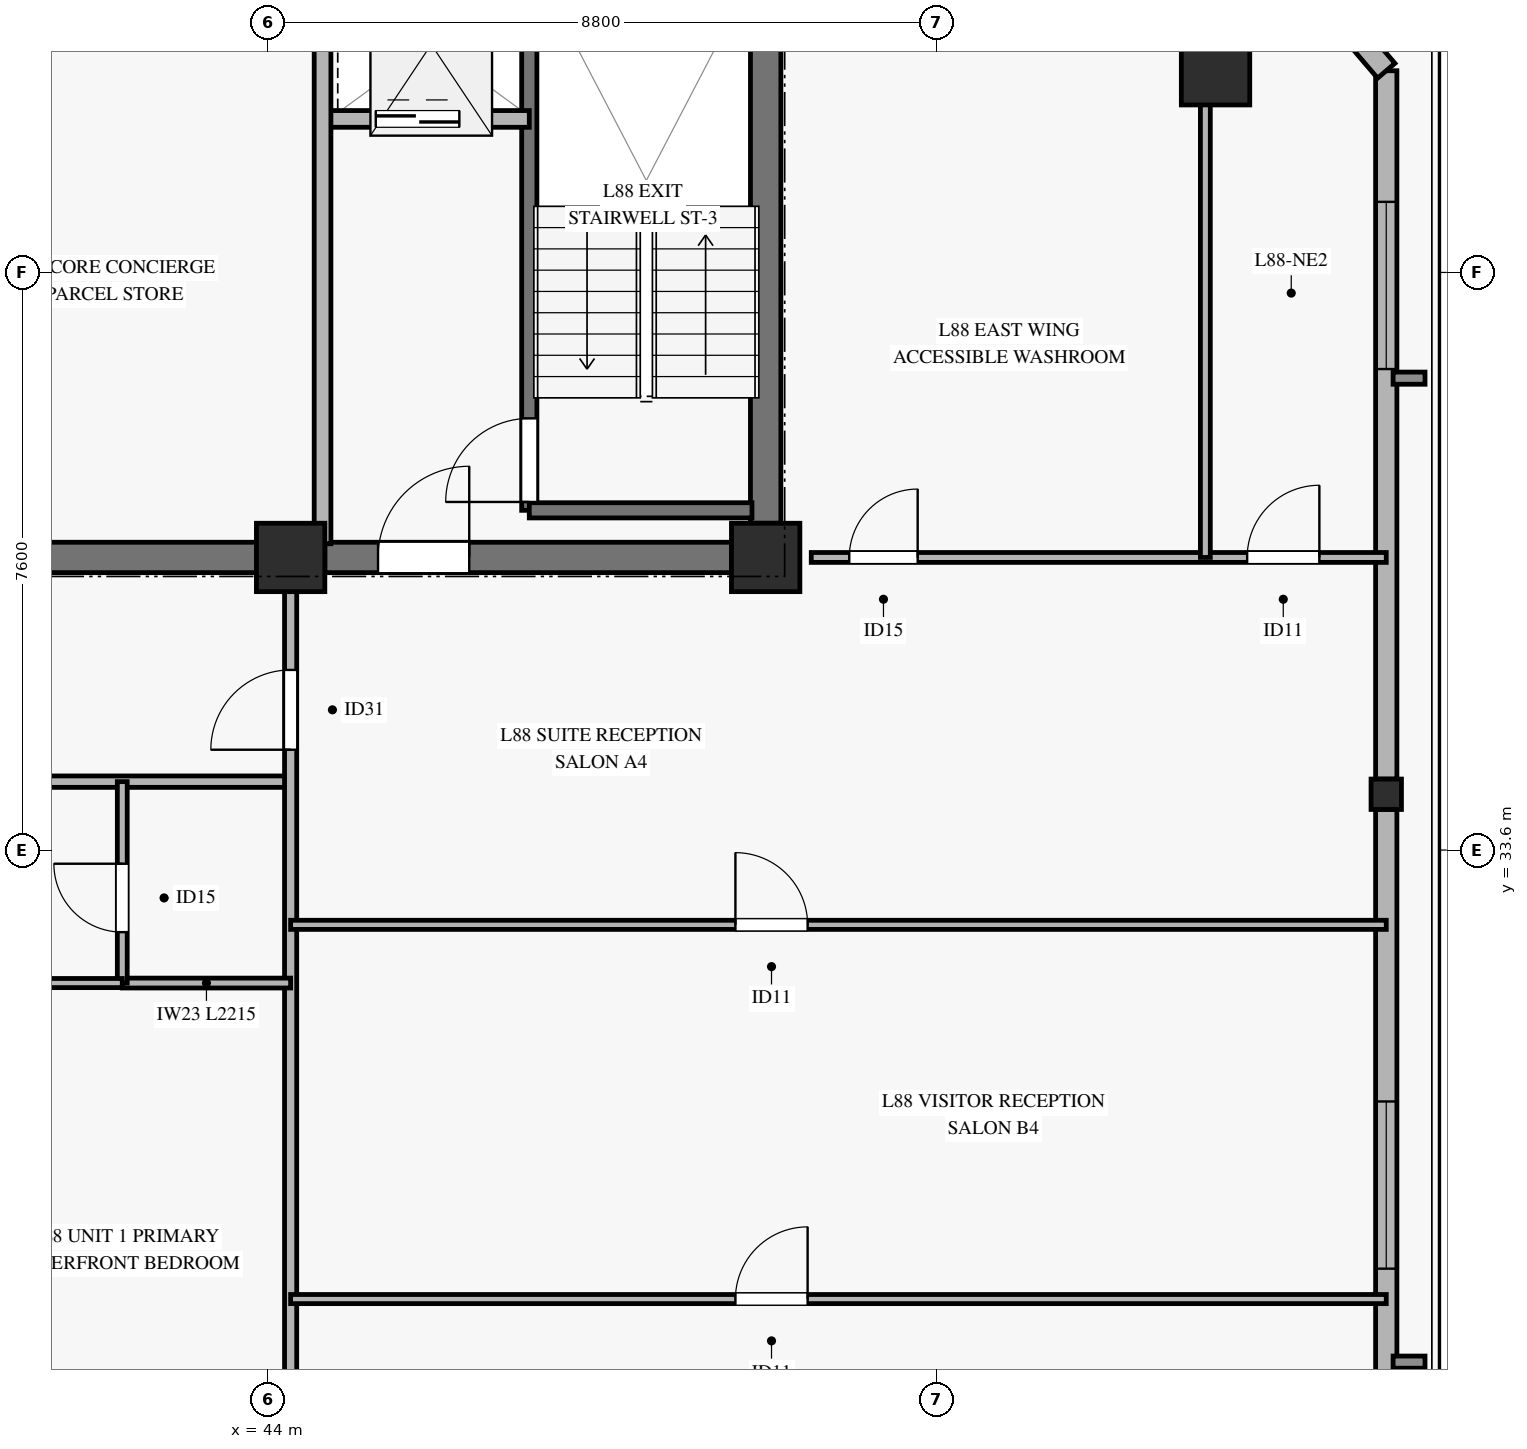
"""IFC4 building model, lengths in metres.
Left out: names, types, materials, properties, quantities, classifications, styles, units other than length and angle.
Written with IfcOpenShell. Run it as: python <this file> out.ifc"""

import sys

from ifc_helpers import new_model, si_unit, direction, frame, frame_2d, origin, origin_2d, place, context, subcontext, project, spatial, rectangle, hollow_rectangle, extrude, source, transform, mapped, element, fill, save


model = new_model("IFC4")
c1 = context("Model", 3, precision=1e-05, world=origin(), true_north=direction((0.0, 1.0)))
c2 = subcontext(c1, "Body", "Model", "MODEL_VIEW")
j1 = project(units=[si_unit("LENGTHUNIT", "METRE"), si_unit("PLANEANGLEUNIT", "RADIAN")], contexts=[c1])
p1 = place(None, origin())
s1 = spatial("IfcSite", under=j1, at=p1, CompositionType="ELEMENT")
p2 = place(p1, origin())
s2 = spatial("IfcBuilding", under=s1, at=p2, CompositionType="ELEMENT")
p3 = place(p2, frame((0.0, 0.0, 339.1)))
s3 = spatial("IfcBuildingStorey", under=s2, at=p3, CompositionType="ELEMENT", Elevation=339.1)
m1 = source(origin(), c2, "Body", "SweptSolid", [
    extrude(rectangle(XDim=0.9, YDim=0.9, at=origin_2d()), origin(), (0.0, 0.0, 1.0), 3.185),
])
for number, where, z_axis, x_axis in (
    (1, (44.3, 37.45, 0.0), (0.0, 0.0, 1.0), (1.0, 0.0, 0.0)),
    (2, (50.55, 37.45, 0.0), (0.0, 0.0, 1.0), (1.0, 0.0, 0.0)),
):
    element("IfcColumn", number, at=place(p3, frame(where, z_axis=z_axis, x_axis=x_axis)), inside=s3, PredefinedType="PILASTER", context=c2, shape_type="MappedRepresentation", body=[
        mapped(m1, transform((0.0, 0.0, 0.0), x_axis=(1.0, 0.0, 0.0), y_axis=(0.0, 1.0, 0.0), z_axis=(0.0, 0.0, 1.0), scale=1.0)),
    ])
p4 = place(p3, frame((36.05, 37.45, 0.0), z_axis=(0.0, 0.0, 1.0), x_axis=(1.0, 0.0, 0.0)))
e3 = element("IfcWall", 3, at=p4, inside=s3, PredefinedType="SHEAR", context=c2, shape_type="SweptSolid", body=[
    extrude(rectangle(XDim=7.8, YDim=0.4, at=frame_2d((3.9, 0.0))), origin(), (0.0, 0.0, 1.0), 3.185),
])
p5 = place(p3, frame((44.75, 37.45, 0.0), z_axis=(0.0, 0.0, 1.0), x_axis=(1.0, 0.0, 0.0)))
e4 = element("IfcWall", 4, at=p5, inside=s3, PredefinedType="SHEAR", context=c2, shape_type="SweptSolid", body=[
    extrude(rectangle(XDim=5.35, YDim=0.4, at=frame_2d((2.675, 0.0))), origin(), (0.0, 0.0, 1.0), 3.185),
])
p6 = place(p5, frame((0.7, 0.0, 0.0)))
e5 = element("IfcOpeningElement", 5, at=p6, cuts=e4, PredefinedType="OPENING", context=c2, shape_type="SweptSolid", body=[
    extrude(rectangle(XDim=1.2, YDim=2.15, at=frame_2d((0.6, 1.075))), frame((0.0, 0.21, 0.0), z_axis=(0.0, -1.0, 0.0), x_axis=(1.0, 0.0, 0.0)), (0.0, 0.0, 1.0), 0.42),
])
p7 = place(p3, frame((50.55, 37.9, 0.0), z_axis=(0.0, 0.0, 1.0), x_axis=(0.0, 1.0, 0.0)))
e6 = element("IfcWall", 6, at=p7, inside=s3, PredefinedType="SHEAR", context=c2, shape_type="SweptSolid", body=[
    extrude(rectangle(XDim=8.2, YDim=0.4, at=frame_2d((4.1, 0.0))), origin(), (0.0, 0.0, 1.0), 3.185),
])
m2 = source(origin(), c2, "Body", "SweptSolid", [
    extrude(hollow_rectangle(XDim=0.9, YDim=0.9, WallThickness=0.04, at=origin_2d()), origin(), (0.0, 0.0, 1.0), 3.185),
])
p8 = place(p3, frame((56.469, 43.854, 0.0), z_axis=(0.0, 0.0, 1.0), x_axis=(1.0, 0.0, 0.0)))
e7 = element("IfcColumn", 7, at=p8, inside=s3, PredefinedType="COLUMN", context=c2, shape_type="MappedRepresentation", body=[
    mapped(m2, transform((0.0, 0.0, 0.0), x_axis=(1.0, 0.0, 0.0), y_axis=(0.0, 1.0, 0.0), z_axis=(0.0, 0.0, 1.0), scale=1.0)),
])
m3 = source(origin(), c2, "Body", "SweptSolid", [
    extrude(hollow_rectangle(XDim=0.4, YDim=0.4, WallThickness=0.02, at=origin_2d()), origin(), (0.0, 0.0, 1.0), 3.185),
])
p9 = place(p3, frame((58.715, 34.334, 0.0), z_axis=(0.0, 0.0, 1.0), x_axis=(1.0, 0.0, 0.0)))
e8 = element("IfcColumn", 8, at=p9, inside=s3, PredefinedType="COLUMN", context=c2, shape_type="MappedRepresentation", body=[
    mapped(m3, transform((0.0, 0.0, 0.0), x_axis=(1.0, 0.0, 0.0), y_axis=(0.0, 1.0, 0.0), z_axis=(0.0, 0.0, 1.0), scale=1.0)),
])
p10 = place(p3, frame((58.715, 24.814, 0.0), z_axis=(0.0, 0.0, 1.0), x_axis=(0.0, 1.0, 0.0)))
e9 = element("IfcWall", 9, at=p10, inside=s3, PredefinedType="SOLIDWALL", context=c2, shape_type="SweptSolid", body=[
    extrude(rectangle(XDim=9.32, YDim=0.28, at=frame_2d((4.66, 0.0))), origin(), (0.0, 0.0, 1.0), 2.815),
])
p11 = place(p10, frame((3.278, 0.0, 0.45)))
e10 = element("IfcOpeningElement", 10, at=p11, cuts=e9, PredefinedType="OPENING", context=c2, shape_type="SweptSolid", body=[
    extrude(rectangle(XDim=2.2, YDim=2.1, at=frame_2d((1.1, 1.05))), frame((0.0, 0.15, 0.0), z_axis=(0.0, -1.0, 0.0), x_axis=(1.0, 0.0, 0.0)), (0.0, 0.0, 1.0), 0.3),
])
p12 = place(p3, frame((58.715, 34.534, 0.0), z_axis=(0.0, 0.0, 1.0), x_axis=(0.0, 1.0, 0.0)))
e11 = element("IfcWall", 11, at=p12, inside=s3, PredefinedType="SOLIDWALL", context=c2, shape_type="SweptSolid", body=[
    extrude(rectangle(XDim=9.32, YDim=0.28, at=frame_2d((4.66, 0.0))), origin(), (0.0, 0.0, 1.0), 2.815),
])
p13 = place(p12, frame((5.395, 0.0, 0.45)))
e12 = element("IfcOpeningElement", 12, at=p13, cuts=e11, PredefinedType="OPENING", context=c2, shape_type="SweptSolid", body=[
    extrude(rectangle(XDim=2.2, YDim=2.1, at=frame_2d((1.1, 1.05))), frame((0.0, 0.15, 0.0), z_axis=(0.0, -1.0, 0.0), x_axis=(1.0, 0.0, 0.0)), (0.0, 0.0, 1.0), 0.3),
])
p14 = place(p3, frame((58.715, 43.854, 0.0), z_axis=(0.0, 0.0, 1.0), x_axis=(-0.64940558052, 0.760442234486, 0.0)))
e13 = element("IfcWall", 13, at=p14, inside=s3, PredefinedType="SOLIDWALL", context=c2, shape_type="SweptSolid", body=[
    extrude(rectangle(XDim=3.151, YDim=0.3, at=frame_2d((1.575, 0.0))), origin(), (0.0, 0.0, 1.0), 2.815),
])
p15 = place(p14, frame((0.775, 0.0, 0.45)))
e14 = element("IfcOpeningElement", 14, at=p15, cuts=e13, PredefinedType="OPENING", context=c2, shape_type="SweptSolid", body=[
    extrude(rectangle(XDim=1.6, YDim=2.0, at=frame_2d((0.8, 1.0))), frame((0.0, 0.16, 0.0), z_axis=(0.0, -1.0, 0.0), x_axis=(1.0, 0.0, 0.0)), (0.0, 0.0, 1.0), 0.32),
])
p16 = place(p3, frame((47.44, 38.07, 0.0), z_axis=(0.0, 0.0, 1.0), x_axis=(0.0, 1.0, 0.0)))
e15 = element("IfcWall", 15, at=p16, inside=s3, PredefinedType="SOLIDWALL", context=c2, shape_type="SweptSolid", body=[
    extrude(rectangle(XDim=7.25, YDim=0.2, at=frame_2d((3.625, 0.0))), origin(), (0.0, 0.0, 1.0), 3.4),
])
p17 = place(p16, frame((0.11, 0.0, 0.0)))
e16 = element("IfcOpeningElement", 16, at=p17, cuts=e15, PredefinedType="OPENING", context=c2, shape_type="SweptSolid", body=[
    extrude(rectangle(XDim=1.1, YDim=2.15, at=frame_2d((0.55, 1.075))), frame((0.0, 0.11, 0.0), z_axis=(0.0, -1.0, 0.0), x_axis=(1.0, 0.0, 0.0)), (0.0, 0.0, 1.0), 0.22),
])
p18 = place(p3, frame((47.44, 38.07, 0.0), z_axis=(0.0, 0.0, 1.0), x_axis=(1.0, 0.0, 0.0)))
e17 = element("IfcWall", 17, at=p18, inside=s3, PredefinedType="SOLIDWALL", context=c2, shape_type="SweptSolid", body=[
    extrude(rectangle(XDim=2.93, YDim=0.2, at=frame_2d((1.465, 0.0))), origin(), (0.0, 0.0, 1.0), 3.4),
])
p19 = place(p3, frame((44.72, 43.22, 0.0), z_axis=(0.0, 0.0, 1.0), x_axis=(1.0, 0.0, 0.0)))
e18 = element("IfcWall", 18, at=p19, inside=s3, PredefinedType="SOLIDWALL", context=c2, shape_type="SweptSolid", body=[
    extrude(rectangle(XDim=2.72, YDim=0.22, at=frame_2d((1.36, 0.0))), origin(), (0.0, 0.0, 1.0), 3.185),
])
p20 = place(p19, frame((0.7, 0.0, 0.0)))
e19 = element("IfcOpeningElement", 19, at=p20, cuts=e18, PredefinedType="OPENING", context=c2, shape_type="SweptSolid", body=[
    extrude(rectangle(XDim=1.1, YDim=2.2, at=frame_2d((0.55, 1.1))), frame((0.0, 0.12, 0.0), z_axis=(0.0, -1.0, 0.0), x_axis=(1.0, 0.0, 0.0)), (0.0, 0.0, 1.0), 0.24),
])
p21 = place(p3, frame((44.72, 37.63, 0.0), z_axis=(0.0, 0.0, 1.0), x_axis=(0.0, 1.0, 0.0)))
e20 = element("IfcWall", 20, at=p21, inside=s3, PredefinedType="SOLIDWALL", context=c2, shape_type="SweptSolid", body=[
    extrude(rectangle(XDim=7.59, YDim=0.22, at=frame_2d((3.795, 0.0))), origin(), (0.0, 0.0, 1.0), 3.185),
])
p22 = place(p3, frame((23.5, 34.5, 0.0), z_axis=(0.0, 0.0, 1.0), x_axis=(1.0, 0.0, 0.0)))
e21 = element("IfcWall", 21, at=p22, inside=s3, PredefinedType="PARTITIONING", context=c2, shape_type="SweptSolid", body=[
    extrude(rectangle(XDim=20.8, YDim=0.15, at=frame_2d((10.4, 0.0))), origin(), (0.0, 0.0, 1.0), 2.47),
])
p23 = place(p22, frame((4.767, 0.0, 0.0)))
e22 = element("IfcOpeningElement", 22, at=p23, cuts=e21, PredefinedType="OPENING", context=c2, shape_type="SweptSolid", body=[
    extrude(rectangle(XDim=1.05, YDim=2.15, at=frame_2d((0.525, 1.075))), frame((0.0, 0.085, 0.0), z_axis=(0.0, -1.0, 0.0), x_axis=(1.0, 0.0, 0.0)), (0.0, 0.0, 1.0), 0.17),
])
p24 = place(p22, frame((16.025, 0.0, 0.0)))
e23 = element("IfcOpeningElement", 23, at=p24, cuts=e21, PredefinedType="OPENING", context=c2, shape_type="SweptSolid", body=[
    extrude(rectangle(XDim=1.05, YDim=2.15, at=frame_2d((0.525, 1.075))), frame((0.0, 0.085, 0.0), z_axis=(0.0, -1.0, 0.0), x_axis=(1.0, 0.0, 0.0)), (0.0, 0.0, 1.0), 0.17),
])
p25 = place(p3, frame((44.3, 22.568, 0.0), z_axis=(0.0, 0.0, 1.0), x_axis=(0.0, 1.0, 0.0)))
e24 = element("IfcWall", 24, at=p25, inside=s3, PredefinedType="PARTITIONING", context=c2, shape_type="SweptSolid", body=[
    extrude(rectangle(XDim=14.882, YDim=0.16, at=frame_2d((7.441, 0.0))), origin(), (0.0, 0.0, 1.0), 2.47),
])
p26 = place(p25, frame((12.352, 0.0, 0.0)))
e25 = element("IfcOpeningElement", 25, at=p26, cuts=e24, PredefinedType="OPENING", context=c2, shape_type="SweptSolid", body=[
    extrude(rectangle(XDim=1.05, YDim=2.15, at=frame_2d((0.525, 1.075))), frame((0.0, 0.09, 0.0), z_axis=(0.0, -1.0, 0.0), x_axis=(1.0, 0.0, 0.0)), (0.0, 0.0, 1.0), 0.18),
])
p27 = place(p3, frame((42.085, 31.85, 0.0), z_axis=(0.0, 0.0, 1.0), x_axis=(1.0, 0.0, 0.0)))
e26 = element("IfcWall", 26, at=p27, inside=s3, PredefinedType="PARTITIONING", context=c2, shape_type="SweptSolid", body=[
    extrude(rectangle(XDim=2.215, YDim=0.13, at=frame_2d((1.107, 0.0))), origin(), (0.0, 0.0, 1.0), 2.47),
])
p28 = place(p3, frame((42.085, 31.85, 0.0), z_axis=(0.0, 0.0, 1.0), x_axis=(0.0, 1.0, 0.0)))
e27 = element("IfcWall", 27, at=p28, inside=s3, PredefinedType="PARTITIONING", context=c2, shape_type="SweptSolid", body=[
    extrude(rectangle(XDim=2.65, YDim=0.13, at=frame_2d((1.325, 0.0))), origin(), (0.0, 0.0, 1.0), 2.77),
])
p29 = place(p28, frame((0.67, 0.0, 0.0)))
e28 = element("IfcOpeningElement", 28, at=p29, cuts=e27, PredefinedType="OPENING", context=c2, shape_type="SweptSolid", body=[
    extrude(rectangle(XDim=0.9, YDim=2.1, at=frame_2d((0.45, 1.05))), frame((0.0, 0.075, 0.0), z_axis=(0.0, -1.0, 0.0), x_axis=(1.0, 0.0, 0.0)), (0.0, 0.0, 1.0), 0.15),
])
p30 = place(p3, frame((39.95, 31.85, 0.0), z_axis=(0.0, 0.0, 1.0), x_axis=(1.0, 0.0, 0.0)))
e29 = element("IfcWall", 29, at=p30, inside=s3, PredefinedType="PARTITIONING", context=c2, shape_type="SweptSolid", body=[
    extrude(rectangle(XDim=2.135, YDim=0.12, at=frame_2d((1.067, 0.0))), origin(), (0.0, 0.0, 1.0), 3.185),
])
p31 = place(p3, frame((44.3, 27.692, 0.0), z_axis=(0.0, 0.0, 1.0), x_axis=(1.0, 0.0, 0.0)))
e30 = element("IfcWall", 30, at=p31, inside=s3, PredefinedType="PARTITIONING", context=c2, shape_type="SweptSolid", body=[
    extrude(rectangle(XDim=14.415, YDim=0.12, at=frame_2d((7.208, 0.0))), origin(), (0.0, 0.0, 1.0), 2.47),
])
p32 = place(p31, frame((5.852, 0.0, 0.0)))
e31 = element("IfcOpeningElement", 31, at=p32, cuts=e30, PredefinedType="OPENING", context=c2, shape_type="SweptSolid", body=[
    extrude(rectangle(XDim=0.95, YDim=2.1, at=frame_2d((0.475, 1.05))), frame((0.0, 0.07, 0.0), z_axis=(0.0, -1.0, 0.0), x_axis=(1.0, 0.0, 0.0)), (0.0, 0.0, 1.0), 0.14),
])
p33 = place(p3, frame((44.3, 32.616, 0.0), z_axis=(0.0, 0.0, 1.0), x_axis=(1.0, 0.0, 0.0)))
e32 = element("IfcWall", 32, at=p33, inside=s3, PredefinedType="PARTITIONING", context=c2, shape_type="SweptSolid", body=[
    extrude(rectangle(XDim=14.415, YDim=0.12, at=frame_2d((7.208, 0.0))), origin(), (0.0, 0.0, 1.0), 2.47),
])
p34 = place(p33, frame((5.852, 0.0, 0.0)))
e33 = element("IfcOpeningElement", 33, at=p34, cuts=e32, PredefinedType="OPENING", context=c2, shape_type="SweptSolid", body=[
    extrude(rectangle(XDim=0.95, YDim=2.1, at=frame_2d((0.475, 1.05))), frame((0.0, 0.07, 0.0), z_axis=(0.0, -1.0, 0.0), x_axis=(1.0, 0.0, 0.0)), (0.0, 0.0, 1.0), 0.14),
])
p35 = place(p3, frame((51.15, 37.45, 0.0), z_axis=(0.0, 0.0, 1.0), x_axis=(1.0, 0.0, 0.0)))
e34 = element("IfcWall", 34, at=p35, inside=s3, PredefinedType="PARTITIONING", context=c2, shape_type="SweptSolid", body=[
    extrude(rectangle(XDim=7.565, YDim=0.13, at=frame_2d((3.783, 0.0))), origin(), (0.0, 0.0, 1.0), 2.82),
])
p36 = place(p35, frame((0.5, 0.0, 0.0)))
e35 = element("IfcOpeningElement", 35, at=p36, cuts=e34, PredefinedType="OPENING", context=c2, shape_type="SweptSolid", body=[
    extrude(rectangle(XDim=0.9, YDim=2.1, at=frame_2d((0.45, 1.05))), frame((0.0, 0.075, 0.0), z_axis=(0.0, -1.0, 0.0), x_axis=(1.0, 0.0, 0.0)), (0.0, 0.0, 1.0), 0.15),
])
p37 = place(p35, frame((5.735, 0.0, 0.0)))
e36 = element("IfcOpeningElement", 36, at=p37, cuts=e34, PredefinedType="OPENING", context=c2, shape_type="SweptSolid", body=[
    extrude(rectangle(XDim=0.95, YDim=2.1, at=frame_2d((0.475, 1.05))), frame((0.0, 0.075, 0.0), z_axis=(0.0, -1.0, 0.0), x_axis=(1.0, 0.0, 0.0)), (0.0, 0.0, 1.0), 0.15),
])
p38 = place(p3, frame((56.335, 37.45, 0.0), z_axis=(0.0, 0.0, 1.0), x_axis=(0.0, 1.0, 0.0)))
e37 = element("IfcWall", 37, at=p38, inside=s3, PredefinedType="PARTITIONING", context=c2, shape_type="SweptSolid", body=[
    extrude(rectangle(XDim=8.8, YDim=0.13, at=frame_2d((4.4, 0.0))), origin(), (0.0, 0.0, 1.0), 2.82),
])
m4 = source(origin(), c2, "Body", "SweptSolid", [
    extrude(rectangle(XDim=2.2, YDim=2.1, at=frame_2d((1.1, 1.05))), frame((0.0, 0.03, 0.0), z_axis=(0.0, -1.0, 0.0), x_axis=(1.0, 0.0, 0.0)), (0.0, 0.0, 1.0), 0.06),
])
p39 = place(p11, origin())
e38 = element("IfcWindow", 38, at=p39, inside=s3, PartitioningType="SINGLE_PANEL", PredefinedType="WINDOW", context=c2, shape_type="MappedRepresentation", body=[
    mapped(m4, transform((0.0, 0.0, 0.0), x_axis=(1.0, 0.0, 0.0), y_axis=(0.0, 1.0, 0.0), z_axis=(0.0, 0.0, 1.0), scale=1.0)),
])
fill(e10, e38)
p40 = place(p13, origin())
e39 = element("IfcWindow", 39, at=p40, inside=s3, PartitioningType="SINGLE_PANEL", PredefinedType="WINDOW", context=c2, shape_type="MappedRepresentation", body=[
    mapped(m4, transform((0.0, 0.0, 0.0), x_axis=(1.0, 0.0, 0.0), y_axis=(0.0, 1.0, 0.0), z_axis=(0.0, 0.0, 1.0), scale=1.0)),
])
fill(e12, e39)
m5 = source(origin(), c2, "Body", "SweptSolid", [
    extrude(rectangle(XDim=1.1, YDim=2.15, at=frame_2d((0.55, 1.075))), frame((0.0, 0.025, 0.0), z_axis=(0.0, -1.0, 0.0), x_axis=(1.0, 0.0, 0.0)), (0.0, 0.0, 1.0), 0.05),
])
p41 = place(p17, origin())
e40 = element("IfcDoor", 40, at=p41, inside=s3, OperationType="SINGLE_SWING_LEFT", PredefinedType="DOOR", context=c2, shape_type="MappedRepresentation", body=[
    mapped(m5, transform((0.0, 0.0, 0.0), x_axis=(1.0, 0.0, 0.0), y_axis=(0.0, 1.0, 0.0), z_axis=(0.0, 0.0, 1.0), scale=1.0)),
])
fill(e16, e40)
m6 = source(origin(), c2, "Body", "SweptSolid", [
    extrude(rectangle(XDim=1.1, YDim=2.2, at=frame_2d((0.55, 1.1))), frame((0.0, 0.025, 0.0), z_axis=(0.0, -1.0, 0.0), x_axis=(1.0, 0.0, 0.0)), (0.0, 0.0, 1.0), 0.05),
])
p42 = place(p20, origin())
e41 = element("IfcDoor", 41, at=p42, inside=s3, OperationType="SLIDING_TO_LEFT", PredefinedType="DOOR", context=c2, shape_type="MappedRepresentation", body=[
    mapped(m6, transform((0.0, 0.0, 0.0), x_axis=(1.0, 0.0, 0.0), y_axis=(0.0, 1.0, 0.0), z_axis=(0.0, 0.0, 1.0), scale=1.0)),
])
fill(e19, e41)
m7 = source(origin(), c2, "Body", "SweptSolid", [
    extrude(rectangle(XDim=1.2, YDim=2.15, at=frame_2d((0.6, 1.075))), frame((0.0, 0.025, 0.0), z_axis=(0.0, -1.0, 0.0), x_axis=(1.0, 0.0, 0.0)), (0.0, 0.0, 1.0), 0.05),
])
p43 = place(p6, origin())
e42 = element("IfcDoor", 42, at=p43, inside=s3, OperationType="SINGLE_SWING_RIGHT", PredefinedType="DOOR", context=c2, shape_type="MappedRepresentation", body=[
    mapped(m7, transform((0.0, 0.0, 0.0), x_axis=(1.0, 0.0, 0.0), y_axis=(0.0, 1.0, 0.0), z_axis=(0.0, 0.0, 1.0), scale=1.0)),
])
fill(e5, e42)
m8 = source(origin(), c2, "Body", "SweptSolid", [
    extrude(rectangle(XDim=0.9, YDim=2.1, at=frame_2d((0.45, 1.05))), frame((0.0, 0.025, 0.0), z_axis=(0.0, -1.0, 0.0), x_axis=(1.0, 0.0, 0.0)), (0.0, 0.0, 1.0), 0.05),
])
p44 = place(p29, origin())
e43 = element("IfcDoor", 43, at=p44, inside=s3, OperationType="SINGLE_SWING_RIGHT", PredefinedType="DOOR", context=c2, shape_type="MappedRepresentation", body=[
    mapped(m8, transform((0.0, 0.0, 0.0), x_axis=(1.0, 0.0, 0.0), y_axis=(0.0, 1.0, 0.0), z_axis=(0.0, 0.0, 1.0), scale=1.0)),
])
fill(e28, e43)
m9 = source(origin(), c2, "Body", "SweptSolid", [
    extrude(rectangle(XDim=1.05, YDim=2.15, at=frame_2d((0.525, 1.075))), frame((0.0, 0.025, 0.0), z_axis=(0.0, -1.0, 0.0), x_axis=(1.0, 0.0, 0.0)), (0.0, 0.0, 1.0), 0.05),
])
p45 = place(p26, origin())
e44 = element("IfcDoor", 44, at=p45, inside=s3, OperationType="SINGLE_SWING_LEFT", PredefinedType="DOOR", context=c2, shape_type="MappedRepresentation", body=[
    mapped(m9, transform((0.0, 0.0, 0.0), x_axis=(1.0, 0.0, 0.0), y_axis=(0.0, 1.0, 0.0), z_axis=(0.0, 0.0, 1.0), scale=1.0)),
])
fill(e25, e44)
m10 = source(origin(), c2, "Body", "SweptSolid", [
    extrude(rectangle(XDim=0.95, YDim=2.1, at=frame_2d((0.475, 1.05))), frame((0.0, 0.025, 0.0), z_axis=(0.0, -1.0, 0.0), x_axis=(1.0, 0.0, 0.0)), (0.0, 0.0, 1.0), 0.05),
])
p46 = place(p34, origin())
e45 = element("IfcDoor", 45, at=p46, inside=s3, OperationType="SINGLE_SWING_LEFT", PredefinedType="DOOR", context=c2, shape_type="MappedRepresentation", body=[
    mapped(m10, transform((0.0, 0.0, 0.0), x_axis=(1.0, 0.0, 0.0), y_axis=(0.0, 1.0, 0.0), z_axis=(0.0, 0.0, 1.0), scale=1.0)),
])
fill(e33, e45)
p47 = place(p32, origin())
e46 = element("IfcDoor", 46, at=p47, inside=s3, OperationType="SINGLE_SWING_RIGHT", PredefinedType="DOOR", context=c2, shape_type="MappedRepresentation", body=[
    mapped(m10, transform((0.0, 0.0, 0.0), x_axis=(1.0, 0.0, 0.0), y_axis=(0.0, 1.0, 0.0), z_axis=(0.0, 0.0, 1.0), scale=1.0)),
])
fill(e31, e46)
p48 = place(p36, origin())
e47 = element("IfcDoor", 47, at=p48, inside=s3, OperationType="SINGLE_SWING_RIGHT", PredefinedType="DOOR", context=c2, shape_type="MappedRepresentation", body=[
    mapped(m8, transform((0.0, 0.0, 0.0), x_axis=(1.0, 0.0, 0.0), y_axis=(0.0, 1.0, 0.0), z_axis=(0.0, 0.0, 1.0), scale=1.0)),
])
fill(e35, e47)
p49 = place(p37, origin())
e48 = element("IfcDoor", 48, at=p49, inside=s3, OperationType="SINGLE_SWING_RIGHT", PredefinedType="DOOR", context=c2, shape_type="MappedRepresentation", body=[
    mapped(m10, transform((0.0, 0.0, 0.0), x_axis=(1.0, 0.0, 0.0), y_axis=(0.0, 1.0, 0.0), z_axis=(0.0, 0.0, 1.0), scale=1.0)),
])
fill(e36, e48)
save(model, sys.argv[1])
